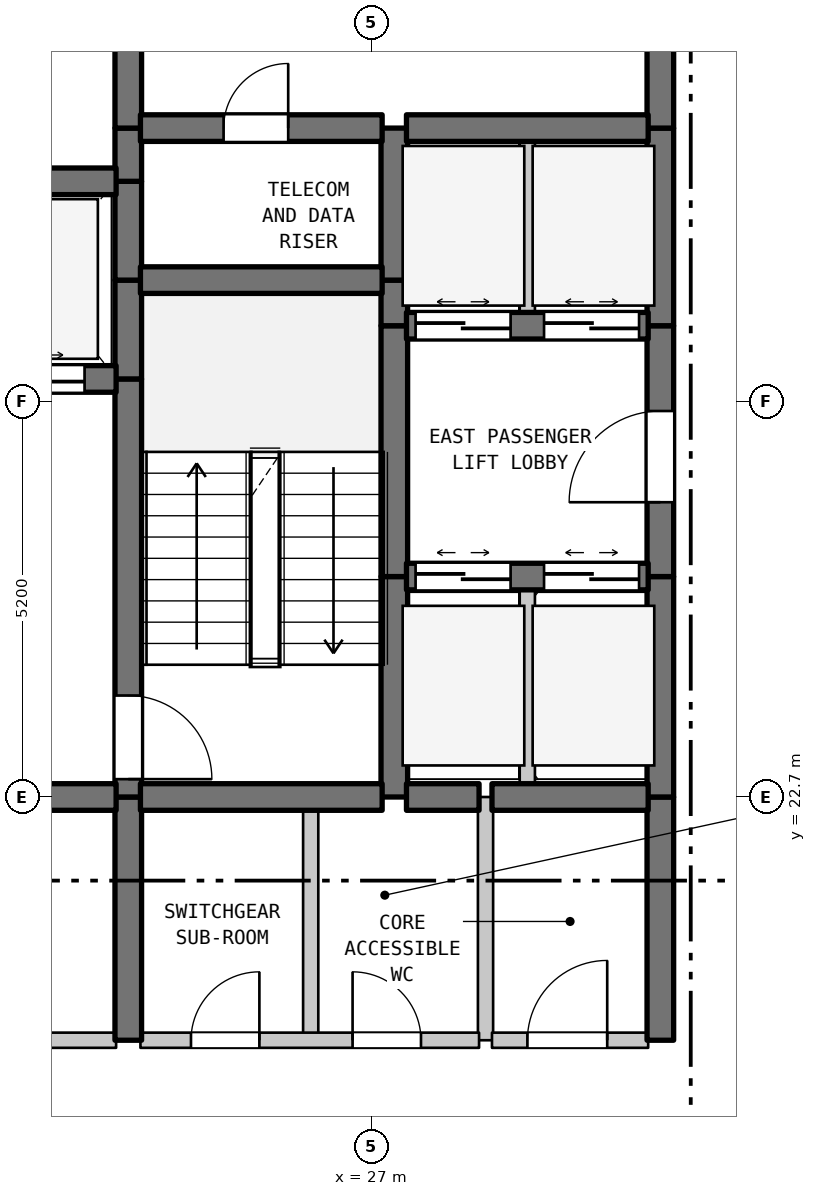
"""IFC4 building model, lengths in metres.
Left out: names, types, materials, properties, quantities, classifications, styles, units other than length and angle.
Written with IfcOpenShell. Run it as: python <this file> out.ifc"""

import sys

from ifc_helpers import new_model, si_unit, direction, frame, frame_2d, origin, place, context, subcontext, project, spatial, rectangle, extrude, element, fill, save


model = new_model("IFC4")
c1 = context("Model", 3, precision=1e-05, world=origin(), true_north=direction((0.0, 1.0)))
c2 = subcontext(c1, "Body", "Model", "MODEL_VIEW")
j1 = project(units=[si_unit("LENGTHUNIT", "METRE"), si_unit("PLANEANGLEUNIT", "RADIAN")], contexts=[c1])
p1 = place(None, origin())
s1 = spatial("IfcSite", under=j1, at=p1, CompositionType="ELEMENT")
p2 = place(p1, origin())
s2 = spatial("IfcBuilding", under=s1, at=p2, CompositionType="ELEMENT")
p3 = place(p2, frame((0.0, 0.0, 133.5)))
s3 = spatial("IfcBuildingStorey", under=s2, at=p3, CompositionType="ELEMENT", Elevation=133.5)
p4 = place(p3, frame((23.8, 19.5, 0.0), z_axis=(0.0, 0.0, 1.0), x_axis=(0.0, 1.0, 0.0)))
e1 = element("IfcWall", 1, at=p4, inside=s3, PredefinedType="SHEAR", context=c2, shape_type="SweptSolid", body=[
    extrude(rectangle(XDim=3.2, YDim=0.35, at=frame_2d((1.6, 0.0))), origin(), (0.0, 0.0, 1.0), 3.385),
])
p5 = place(p3, frame((23.8, 22.7, 0.0), z_axis=(0.0, 0.0, 1.0), x_axis=(0.0, 1.0, 0.0)))
e2 = element("IfcWall", 2, at=p5, inside=s3, PredefinedType="SHEAR", context=c2, shape_type="SweptSolid", body=[
    extrude(rectangle(XDim=5.5, YDim=0.35, at=frame_2d((2.75, 0.0))), origin(), (0.0, 0.0, 1.0), 3.385),
])
p6 = place(p5, frame((0.235, 0.0, 0.0)))
e3 = element("IfcOpeningElement", 3, at=p6, cuts=e2, PredefinedType="OPENING", context=c2, shape_type="SweptSolid", body=[
    extrude(rectangle(XDim=1.1, YDim=2.15, at=frame_2d((0.55, 1.075))), frame((0.0, 0.185, 0.0), z_axis=(0.0, -1.0, 0.0), x_axis=(1.0, 0.0, 0.0)), (0.0, 0.0, 1.0), 0.37),
])
for number, where, z_axis, x_axis in (
    (4, (23.8, 28.2, 0.0), (0.0, 0.0, 1.0), (0.0, 1.0, 0.0)),
    (5, (23.8, 29.5, 0.0), (0.0, 0.0, 1.0), (0.0, 1.0, 0.0)),
):
    element("IfcWall", number, at=place(p3, frame(where, z_axis=z_axis, x_axis=x_axis)), inside=s3, PredefinedType="SHEAR", context=c2, shape_type="SweptSolid", body=[
        extrude(rectangle(XDim=1.3, YDim=0.35, at=frame_2d((0.65, 0.0))), origin(), (0.0, 0.0, 1.0), 3.385),
    ])
p7 = place(p3, frame((23.8, 30.8, 0.0), z_axis=(0.0, 0.0, 1.0), x_axis=(0.0, 1.0, 0.0)))
e6 = element("IfcWall", 6, at=p7, inside=s3, PredefinedType="SHEAR", context=c2, shape_type="SweptSolid", body=[
    extrude(rectangle(XDim=0.7, YDim=0.35, at=frame_2d((0.35, 0.0))), origin(), (0.0, 0.0, 1.0), 3.385),
])
p8 = place(p3, frame((23.8, 31.5, 0.0), z_axis=(0.0, 0.0, 1.0), x_axis=(0.0, 1.0, 0.0)))
e7 = element("IfcWall", 7, at=p8, inside=s3, PredefinedType="SHEAR", context=c2, shape_type="SweptSolid", body=[
    extrude(rectangle(XDim=3.5, YDim=0.35, at=frame_2d((1.75, 0.0))), origin(), (0.0, 0.0, 1.0), 3.385),
])
p9 = place(p8, frame((1.127, 0.0, 0.0)))
e8 = element("IfcOpeningElement", 8, at=p9, cuts=e7, PredefinedType="OPENING", context=c2, shape_type="SweptSolid", body=[
    extrude(rectangle(XDim=1.1, YDim=2.15, at=frame_2d((0.55, 1.075))), frame((0.0, 0.185, 0.0), z_axis=(0.0, -1.0, 0.0), x_axis=(1.0, 0.0, 0.0)), (0.0, 0.0, 1.0), 0.37),
])
p10 = place(p3, frame((26.2, 19.5, 0.0), z_axis=(0.0, 0.0, 1.0), x_axis=(0.0, 1.0, 0.0)))
e9 = element("IfcWall", 9, at=p10, inside=s3, PredefinedType="STANDARD", context=c2, shape_type="SweptSolid", body=[
    extrude(rectangle(XDim=3.2, YDim=0.2, at=frame_2d((1.6, 0.0))), origin(), (0.0, 0.0, 1.0), 3.385),
])
p11 = place(p3, frame((27.3, 22.7, 0.0), z_axis=(0.0, 0.0, 1.0), x_axis=(0.0, 1.0, 0.0)))
e10 = element("IfcWall", 10, at=p11, inside=s3, PredefinedType="SHEAR", context=c2, shape_type="SweptSolid", body=[
    extrude(rectangle(XDim=2.9, YDim=0.35, at=frame_2d((1.45, 0.0))), origin(), (0.0, 0.0, 1.0), 3.385),
])
p12 = place(p3, frame((27.3, 25.6, 0.0), z_axis=(0.0, 0.0, 1.0), x_axis=(0.0, 1.0, 0.0)))
e11 = element("IfcWall", 11, at=p12, inside=s3, PredefinedType="SHEAR", context=c2, shape_type="SweptSolid", body=[
    extrude(rectangle(XDim=3.3, YDim=0.35, at=frame_2d((1.65, 0.0))), origin(), (0.0, 0.0, 1.0), 3.385),
])
p13 = place(p3, frame((27.3, 28.9, 0.0), z_axis=(0.0, 0.0, 1.0), x_axis=(0.0, 1.0, 0.0)))
e12 = element("IfcWall", 12, at=p13, inside=s3, PredefinedType="SHEAR", context=c2, shape_type="SweptSolid", body=[
    extrude(rectangle(XDim=0.6, YDim=0.35, at=frame_2d((0.3, 0.0))), origin(), (0.0, 0.0, 1.0), 3.385),
])
p14 = place(p3, frame((27.3, 29.5, 0.0), z_axis=(0.0, 0.0, 1.0), x_axis=(0.0, 1.0, 0.0)))
e13 = element("IfcWall", 13, at=p14, inside=s3, PredefinedType="SHEAR", context=c2, shape_type="SweptSolid", body=[
    extrude(rectangle(XDim=2.0, YDim=0.35, at=frame_2d((1.0, 0.0))), origin(), (0.0, 0.0, 1.0), 3.385),
])
p15 = place(p3, frame((28.5, 19.5, 0.0), z_axis=(0.0, 0.0, 1.0), x_axis=(0.0, 1.0, 0.0)))
e14 = element("IfcWall", 14, at=p15, inside=s3, PredefinedType="STANDARD", context=c2, shape_type="SweptSolid", body=[
    extrude(rectangle(XDim=3.2, YDim=0.2, at=frame_2d((1.6, 0.0))), origin(), (0.0, 0.0, 1.0), 3.385),
])
p16 = place(p3, frame((29.05, 22.7, 0.0), z_axis=(0.0, 0.0, 1.0), x_axis=(0.0, 1.0, 0.0)))
e15 = element("IfcWall", 15, at=p16, inside=s3, PredefinedType="STANDARD", context=c2, shape_type="SweptSolid", body=[
    extrude(rectangle(XDim=2.9, YDim=0.2, at=frame_2d((1.45, 0.0))), origin(), (0.0, 0.0, 1.0), 3.385),
])
p17 = place(p3, frame((29.05, 28.9, 0.0), z_axis=(0.0, 0.0, 1.0), x_axis=(0.0, 1.0, 0.0)))
e16 = element("IfcWall", 16, at=p17, inside=s3, PredefinedType="STANDARD", context=c2, shape_type="SweptSolid", body=[
    extrude(rectangle(XDim=2.6, YDim=0.2, at=frame_2d((1.3, 0.0))), origin(), (0.0, 0.0, 1.0), 3.385),
])
p18 = place(p3, frame((30.8, 19.5, 0.0), z_axis=(0.0, 0.0, 1.0), x_axis=(0.0, 1.0, 0.0)))
e17 = element("IfcWall", 17, at=p18, inside=s3, PredefinedType="SHEAR", context=c2, shape_type="SweptSolid", body=[
    extrude(rectangle(XDim=3.2, YDim=0.35, at=frame_2d((1.6, 0.0))), origin(), (0.0, 0.0, 1.0), 3.385),
])
p19 = place(p3, frame((30.8, 22.7, 0.0), z_axis=(0.0, 0.0, 1.0), x_axis=(0.0, 1.0, 0.0)))
e18 = element("IfcWall", 18, at=p19, inside=s3, PredefinedType="SHEAR", context=c2, shape_type="SweptSolid", body=[
    extrude(rectangle(XDim=2.9, YDim=0.35, at=frame_2d((1.45, 0.0))), origin(), (0.0, 0.0, 1.0), 3.385),
])
p20 = place(p3, frame((30.8, 25.6, 0.0), z_axis=(0.0, 0.0, 1.0), x_axis=(0.0, 1.0, 0.0)))
e19 = element("IfcWall", 19, at=p20, inside=s3, PredefinedType="SHEAR", context=c2, shape_type="SweptSolid", body=[
    extrude(rectangle(XDim=3.3, YDim=0.35, at=frame_2d((1.65, 0.0))), origin(), (0.0, 0.0, 1.0), 3.385),
])
p21 = place(p20, frame((0.978, 0.0, 0.0)))
e20 = element("IfcOpeningElement", 20, at=p21, cuts=e19, PredefinedType="OPENING", context=c2, shape_type="SweptSolid", body=[
    extrude(rectangle(XDim=1.2, YDim=2.2, at=frame_2d((0.6, 1.1))), frame((0.0, 0.185, 0.0), z_axis=(0.0, -1.0, 0.0), x_axis=(1.0, 0.0, 0.0)), (0.0, 0.0, 1.0), 0.37),
])
p22 = place(p3, frame((30.8, 28.9, 0.0), z_axis=(0.0, 0.0, 1.0), x_axis=(0.0, 1.0, 0.0)))
e21 = element("IfcWall", 21, at=p22, inside=s3, PredefinedType="SHEAR", context=c2, shape_type="SweptSolid", body=[
    extrude(rectangle(XDim=2.6, YDim=0.35, at=frame_2d((1.3, 0.0))), origin(), (0.0, 0.0, 1.0), 3.385),
])
p23 = place(p3, frame((30.8, 31.5, 0.0), z_axis=(0.0, 0.0, 1.0), x_axis=(0.0, 1.0, 0.0)))
e22 = element("IfcWall", 22, at=p23, inside=s3, PredefinedType="SHEAR", context=c2, shape_type="SweptSolid", body=[
    extrude(rectangle(XDim=3.5, YDim=0.35, at=frame_2d((1.75, 0.0))), origin(), (0.0, 0.0, 1.0), 3.385),
])
p24 = place(p23, frame((1.15, 0.0, 0.0)))
e23 = element("IfcOpeningElement", 23, at=p24, cuts=e22, PredefinedType="OPENING", context=c2, shape_type="SweptSolid", body=[
    extrude(rectangle(XDim=1.2, YDim=2.2, at=frame_2d((0.6, 1.1))), frame((0.0, 0.185, 0.0), z_axis=(0.0, -1.0, 0.0), x_axis=(1.0, 0.0, 0.0)), (0.0, 0.0, 1.0), 0.37),
])
p25 = place(p3, frame((19.16, 19.5, 0.0), z_axis=(0.0, 0.0, 1.0), x_axis=(1.0, 0.0, 0.0)))
e24 = element("IfcWall", 24, at=p25, inside=s3, PredefinedType="STANDARD", context=c2, shape_type="SweptSolid", body=[
    extrude(rectangle(XDim=4.48, YDim=0.2, at=frame_2d((2.24, 0.0))), origin(), (0.0, 0.0, 1.0), 3.385),
])
p26 = place(p25, frame((1.64, 0.0, 0.0)))
e25 = element("IfcOpeningElement", 25, at=p26, cuts=e24, PredefinedType="OPENING", context=c2, shape_type="SweptSolid", body=[
    extrude(rectangle(XDim=1.2, YDim=2.2, at=frame_2d((0.6, 1.1))), frame((0.0, 0.11, 0.0), z_axis=(0.0, -1.0, 0.0), x_axis=(1.0, 0.0, 0.0)), (0.0, 0.0, 1.0), 0.22),
])
p27 = place(p3, frame((23.96, 19.5, 0.0), z_axis=(0.0, 0.0, 1.0), x_axis=(1.0, 0.0, 0.0)))
e26 = element("IfcWall", 26, at=p27, inside=s3, PredefinedType="STANDARD", context=c2, shape_type="SweptSolid", body=[
    extrude(rectangle(XDim=4.455, YDim=0.2, at=frame_2d((2.228, 0.0))), origin(), (0.0, 0.0, 1.0), 3.385),
])
p28 = place(p27, frame((0.665, 0.0, 0.0)))
e27 = element("IfcOpeningElement", 27, at=p28, cuts=e26, PredefinedType="OPENING", context=c2, shape_type="SweptSolid", body=[
    extrude(rectangle(XDim=0.9, YDim=2.15, at=frame_2d((0.45, 1.075))), frame((0.0, 0.11, 0.0), z_axis=(0.0, -1.0, 0.0), x_axis=(1.0, 0.0, 0.0)), (0.0, 0.0, 1.0), 0.22),
])
p29 = place(p27, frame((2.791, 0.0, 0.0)))
e28 = element("IfcOpeningElement", 28, at=p29, cuts=e26, PredefinedType="OPENING", context=c2, shape_type="SweptSolid", body=[
    extrude(rectangle(XDim=0.9, YDim=2.15, at=frame_2d((0.45, 1.075))), frame((0.0, 0.11, 0.0), z_axis=(0.0, -1.0, 0.0), x_axis=(1.0, 0.0, 0.0)), (0.0, 0.0, 1.0), 0.22),
])
p30 = place(p3, frame((28.585, 19.5, 0.0), z_axis=(0.0, 0.0, 1.0), x_axis=(1.0, 0.0, 0.0)))
e29 = element("IfcWall", 29, at=p30, inside=s3, PredefinedType="STANDARD", context=c2, shape_type="SweptSolid", body=[
    extrude(rectangle(XDim=2.055, YDim=0.2, at=frame_2d((1.027, 0.0))), origin(), (0.0, 0.0, 1.0), 3.385),
])
p31 = place(p30, frame((0.466, 0.0, 0.0)))
e30 = element("IfcOpeningElement", 30, at=p31, cuts=e29, PredefinedType="OPENING", context=c2, shape_type="SweptSolid", body=[
    extrude(rectangle(XDim=1.05, YDim=2.15, at=frame_2d((0.525, 1.075))), frame((0.0, 0.11, 0.0), z_axis=(0.0, -1.0, 0.0), x_axis=(1.0, 0.0, 0.0)), (0.0, 0.0, 1.0), 0.22),
])
p32 = place(p3, frame((19.16, 22.7, 0.0), z_axis=(0.0, 0.0, 1.0), x_axis=(1.0, 0.0, 0.0)))
e31 = element("IfcWall", 31, at=p32, inside=s3, PredefinedType="SHEAR", context=c2, shape_type="SweptSolid", body=[
    extrude(rectangle(XDim=4.48, YDim=0.35, at=frame_2d((2.24, 0.0))), origin(), (0.0, 0.0, 1.0), 3.385),
])
p33 = place(p32, frame((1.64, 0.0, 0.0)))
e32 = element("IfcOpeningElement", 32, at=p33, cuts=e31, PredefinedType="OPENING", context=c2, shape_type="SweptSolid", body=[
    extrude(rectangle(XDim=1.2, YDim=2.2, at=frame_2d((0.6, 1.1))), frame((0.0, 0.185, 0.0), z_axis=(0.0, -1.0, 0.0), x_axis=(1.0, 0.0, 0.0)), (0.0, 0.0, 1.0), 0.37),
])
p34 = place(p3, frame((23.96, 22.7, 0.0), z_axis=(0.0, 0.0, 1.0), x_axis=(1.0, 0.0, 0.0)))
e33 = element("IfcWall", 33, at=p34, inside=s3, PredefinedType="SHEAR", context=c2, shape_type="SweptSolid", body=[
    extrude(rectangle(XDim=3.18, YDim=0.35, at=frame_2d((1.59, 0.0))), origin(), (0.0, 0.0, 1.0), 3.385),
])
p35 = place(p3, frame((27.46, 22.7, 0.0), z_axis=(0.0, 0.0, 1.0), x_axis=(1.0, 0.0, 0.0)))
e34 = element("IfcWall", 34, at=p35, inside=s3, PredefinedType="SHEAR", context=c2, shape_type="SweptSolid", body=[
    extrude(rectangle(XDim=0.955, YDim=0.35, at=frame_2d((0.478, 0.0))), origin(), (0.0, 0.0, 1.0), 3.385),
])
p36 = place(p3, frame((28.585, 22.7, 0.0), z_axis=(0.0, 0.0, 1.0), x_axis=(1.0, 0.0, 0.0)))
e35 = element("IfcWall", 35, at=p36, inside=s3, PredefinedType="SHEAR", context=c2, shape_type="SweptSolid", body=[
    extrude(rectangle(XDim=2.055, YDim=0.35, at=frame_2d((1.027, 0.0))), origin(), (0.0, 0.0, 1.0), 3.385),
])
p37 = place(p3, frame((27.46, 25.6, 0.0), z_axis=(0.0, 0.0, 1.0), x_axis=(1.0, 0.0, 0.0)))
e36 = element("IfcWall", 36, at=p37, inside=s3, PredefinedType="SHEAR", context=c2, shape_type="SweptSolid", body=[
    extrude(rectangle(XDim=3.18, YDim=0.35, at=frame_2d((1.59, 0.0))), origin(), (0.0, 0.0, 1.0), 3.385),
])
p38 = place(p37, frame((0.12, 0.0, 0.0)))
e37 = element("IfcOpeningElement", 37, at=p38, cuts=e36, PredefinedType="OPENING", context=c2, shape_type="SweptSolid", body=[
    extrude(rectangle(XDim=1.25, YDim=2.2, at=frame_2d((0.625, 1.1))), frame((0.0, 0.185, 0.0), z_axis=(0.0, -1.0, 0.0), x_axis=(1.0, 0.0, 0.0)), (0.0, 0.0, 1.0), 0.37),
])
p39 = place(p37, frame((1.81, 0.0, 0.0)))
e38 = element("IfcOpeningElement", 38, at=p39, cuts=e36, PredefinedType="OPENING", context=c2, shape_type="SweptSolid", body=[
    extrude(rectangle(XDim=1.25, YDim=2.2, at=frame_2d((0.625, 1.1))), frame((0.0, 0.185, 0.0), z_axis=(0.0, -1.0, 0.0), x_axis=(1.0, 0.0, 0.0)), (0.0, 0.0, 1.0), 0.37),
])
p40 = place(p3, frame((19.16, 28.2, 0.0), z_axis=(0.0, 0.0, 1.0), x_axis=(1.0, 0.0, 0.0)))
e39 = element("IfcWall", 39, at=p40, inside=s3, PredefinedType="SHEAR", context=c2, shape_type="SweptSolid", body=[
    extrude(rectangle(XDim=4.48, YDim=0.35, at=frame_2d((2.24, 0.0))), origin(), (0.0, 0.0, 1.0), 3.385),
])
p41 = place(p40, frame((0.415, 0.0, 0.0)))
e40 = element("IfcOpeningElement", 40, at=p41, cuts=e39, PredefinedType="OPENING", context=c2, shape_type="SweptSolid", body=[
    extrude(rectangle(XDim=1.25, YDim=2.2, at=frame_2d((0.625, 1.1))), frame((0.0, 0.185, 0.0), z_axis=(0.0, -1.0, 0.0), x_axis=(1.0, 0.0, 0.0)), (0.0, 0.0, 1.0), 0.37),
])
p42 = place(p40, frame((2.815, 0.0, 0.0)))
e41 = element("IfcOpeningElement", 41, at=p42, cuts=e39, PredefinedType="OPENING", context=c2, shape_type="SweptSolid", body=[
    extrude(rectangle(XDim=1.25, YDim=2.2, at=frame_2d((0.625, 1.1))), frame((0.0, 0.185, 0.0), z_axis=(0.0, -1.0, 0.0), x_axis=(1.0, 0.0, 0.0)), (0.0, 0.0, 1.0), 0.37),
])
p43 = place(p3, frame((27.46, 28.9, 0.0), z_axis=(0.0, 0.0, 1.0), x_axis=(1.0, 0.0, 0.0)))
e42 = element("IfcWall", 42, at=p43, inside=s3, PredefinedType="SHEAR", context=c2, shape_type="SweptSolid", body=[
    extrude(rectangle(XDim=3.18, YDim=0.35, at=frame_2d((1.59, 0.0))), origin(), (0.0, 0.0, 1.0), 3.385),
])
p44 = place(p43, frame((0.12, 0.0, 0.0)))
e43 = element("IfcOpeningElement", 43, at=p44, cuts=e42, PredefinedType="OPENING", context=c2, shape_type="SweptSolid", body=[
    extrude(rectangle(XDim=1.25, YDim=2.2, at=frame_2d((0.625, 1.1))), frame((0.0, 0.185, 0.0), z_axis=(0.0, -1.0, 0.0), x_axis=(1.0, 0.0, 0.0)), (0.0, 0.0, 1.0), 0.37),
])
p45 = place(p43, frame((1.81, 0.0, 0.0)))
e44 = element("IfcOpeningElement", 44, at=p45, cuts=e42, PredefinedType="OPENING", context=c2, shape_type="SweptSolid", body=[
    extrude(rectangle(XDim=1.25, YDim=2.2, at=frame_2d((0.625, 1.1))), frame((0.0, 0.185, 0.0), z_axis=(0.0, -1.0, 0.0), x_axis=(1.0, 0.0, 0.0)), (0.0, 0.0, 1.0), 0.37),
])
p46 = place(p3, frame((23.96, 29.5, 0.0), z_axis=(0.0, 0.0, 1.0), x_axis=(1.0, 0.0, 0.0)))
e45 = element("IfcWall", 45, at=p46, inside=s3, PredefinedType="SHEAR", context=c2, shape_type="SweptSolid", body=[
    extrude(rectangle(XDim=3.18, YDim=0.35, at=frame_2d((1.59, 0.0))), origin(), (0.0, 0.0, 1.0), 3.385),
])
p47 = place(p3, frame((19.16, 30.8, 0.0), z_axis=(0.0, 0.0, 1.0), x_axis=(1.0, 0.0, 0.0)))
e46 = element("IfcWall", 46, at=p47, inside=s3, PredefinedType="SHEAR", context=c2, shape_type="SweptSolid", body=[
    extrude(rectangle(XDim=4.48, YDim=0.35, at=frame_2d((2.24, 0.0))), origin(), (0.0, 0.0, 1.0), 3.385),
])
p48 = place(p3, frame((23.96, 31.5, 0.0), z_axis=(0.0, 0.0, 1.0), x_axis=(1.0, 0.0, 0.0)))
e47 = element("IfcWall", 47, at=p48, inside=s3, PredefinedType="SHEAR", context=c2, shape_type="SweptSolid", body=[
    extrude(rectangle(XDim=3.18, YDim=0.35, at=frame_2d((1.59, 0.0))), origin(), (0.0, 0.0, 1.0), 3.385),
])
p49 = place(p48, frame((1.094, 0.0, 0.0)))
e48 = element("IfcOpeningElement", 48, at=p49, cuts=e47, PredefinedType="OPENING", context=c2, shape_type="SweptSolid", body=[
    extrude(rectangle(XDim=0.85, YDim=2.1, at=frame_2d((0.425, 1.05))), frame((0.0, 0.185, 0.0), z_axis=(0.0, -1.0, 0.0), x_axis=(1.0, 0.0, 0.0)), (0.0, 0.0, 1.0), 0.37),
])
p50 = place(p3, frame((27.46, 31.5, 0.0), z_axis=(0.0, 0.0, 1.0), x_axis=(1.0, 0.0, 0.0)))
e49 = element("IfcWall", 49, at=p50, inside=s3, PredefinedType="SHEAR", context=c2, shape_type="SweptSolid", body=[
    extrude(rectangle(XDim=3.18, YDim=0.35, at=frame_2d((1.59, 0.0))), origin(), (0.0, 0.0, 1.0), 3.385),
])
p51 = place(p6, frame((1.1, 0.0, 0.0), z_axis=(0.0, 0.0, 1.0), x_axis=(-1.0, 0.0, 0.0)))
e50 = element("IfcDoor", 50, at=p51, inside=s3, OperationType="SINGLE_SWING_LEFT", PredefinedType="DOOR", context=c2, shape_type="SweptSolid", body=[
    extrude(rectangle(XDim=1.1, YDim=2.15, at=frame_2d((0.55, 1.075))), frame((0.0, 0.025, 0.0), z_axis=(0.0, -1.0, 0.0), x_axis=(1.0, 0.0, 0.0)), (0.0, 0.0, 1.0), 0.05),
])
fill(e3, e50)
p52 = place(p21, origin())
e51 = element("IfcDoor", 51, at=p52, inside=s3, OperationType="SINGLE_SWING_LEFT", PredefinedType="DOOR", context=c2, shape_type="SweptSolid", body=[
    extrude(rectangle(XDim=1.2, YDim=2.2, at=frame_2d((0.6, 1.1))), frame((0.0, 0.025, 0.0), z_axis=(0.0, -1.0, 0.0), x_axis=(1.0, 0.0, 0.0)), (0.0, 0.0, 1.0), 0.05),
])
fill(e20, e51)
p53 = place(p28, origin())
e52 = element("IfcDoor", 52, at=p53, inside=s3, OperationType="SINGLE_SWING_RIGHT", PredefinedType="DOOR", context=c2, shape_type="SweptSolid", body=[
    extrude(rectangle(XDim=0.9, YDim=2.15, at=frame_2d((0.45, 1.075))), frame((0.0, 0.025, 0.0), z_axis=(0.0, -1.0, 0.0), x_axis=(1.0, 0.0, 0.0)), (0.0, 0.0, 1.0), 0.05),
])
fill(e27, e52)
p54 = place(p29, origin())
e53 = element("IfcDoor", 53, at=p54, inside=s3, OperationType="SINGLE_SWING_LEFT", PredefinedType="DOOR", context=c2, shape_type="SweptSolid", body=[
    extrude(rectangle(XDim=0.9, YDim=2.15, at=frame_2d((0.45, 1.075))), frame((0.0, 0.025, 0.0), z_axis=(0.0, -1.0, 0.0), x_axis=(1.0, 0.0, 0.0)), (0.0, 0.0, 1.0), 0.05),
])
fill(e28, e53)
p55 = place(p31, origin())
e54 = element("IfcDoor", 54, at=p55, inside=s3, OperationType="SINGLE_SWING_RIGHT", PredefinedType="DOOR", context=c2, shape_type="SweptSolid", body=[
    extrude(rectangle(XDim=1.05, YDim=2.15, at=frame_2d((0.525, 1.075))), frame((0.0, 0.025, 0.0), z_axis=(0.0, -1.0, 0.0), x_axis=(1.0, 0.0, 0.0)), (0.0, 0.0, 1.0), 0.05),
])
fill(e30, e54)
p56 = place(p38, origin())
e55 = element("IfcDoor", 55, at=p56, inside=s3, OperationType="DOUBLE_DOOR_SLIDING", PredefinedType="DOOR", context=c2, shape_type="SweptSolid", body=[
    extrude(rectangle(XDim=1.25, YDim=2.2, at=frame_2d((0.625, 1.1))), frame((0.0, 0.025, 0.0), z_axis=(0.0, -1.0, 0.0), x_axis=(1.0, 0.0, 0.0)), (0.0, 0.0, 1.0), 0.05),
])
fill(e37, e55)
p57 = place(p39, origin())
e56 = element("IfcDoor", 56, at=p57, inside=s3, OperationType="DOUBLE_DOOR_SLIDING", PredefinedType="DOOR", context=c2, shape_type="SweptSolid", body=[
    extrude(rectangle(XDim=1.25, YDim=2.2, at=frame_2d((0.625, 1.1))), frame((0.0, 0.025, 0.0), z_axis=(0.0, -1.0, 0.0), x_axis=(1.0, 0.0, 0.0)), (0.0, 0.0, 1.0), 0.05),
])
fill(e38, e56)
p58 = place(p42, origin())
e57 = element("IfcDoor", 57, at=p58, inside=s3, OperationType="DOUBLE_DOOR_SLIDING", PredefinedType="DOOR", context=c2, shape_type="SweptSolid", body=[
    extrude(rectangle(XDim=1.25, YDim=2.2, at=frame_2d((0.625, 1.1))), frame((0.0, 0.025, 0.0), z_axis=(0.0, -1.0, 0.0), x_axis=(1.0, 0.0, 0.0)), (0.0, 0.0, 1.0), 0.05),
])
fill(e41, e57)
p59 = place(p44, origin())
e58 = element("IfcDoor", 58, at=p59, inside=s3, OperationType="DOUBLE_DOOR_SLIDING", PredefinedType="DOOR", context=c2, shape_type="SweptSolid", body=[
    extrude(rectangle(XDim=1.25, YDim=2.2, at=frame_2d((0.625, 1.1))), frame((0.0, 0.025, 0.0), z_axis=(0.0, -1.0, 0.0), x_axis=(1.0, 0.0, 0.0)), (0.0, 0.0, 1.0), 0.05),
])
fill(e43, e58)
p60 = place(p45, origin())
e59 = element("IfcDoor", 59, at=p60, inside=s3, OperationType="DOUBLE_DOOR_SLIDING", PredefinedType="DOOR", context=c2, shape_type="SweptSolid", body=[
    extrude(rectangle(XDim=1.25, YDim=2.2, at=frame_2d((0.625, 1.1))), frame((0.0, 0.025, 0.0), z_axis=(0.0, -1.0, 0.0), x_axis=(1.0, 0.0, 0.0)), (0.0, 0.0, 1.0), 0.05),
])
fill(e44, e59)
p61 = place(p49, origin())
e60 = element("IfcDoor", 60, at=p61, inside=s3, OperationType="SINGLE_SWING_RIGHT", PredefinedType="DOOR", context=c2, shape_type="SweptSolid", body=[
    extrude(rectangle(XDim=0.85, YDim=2.1, at=frame_2d((0.425, 1.05))), frame((0.0, 0.025, 0.0), z_axis=(0.0, -1.0, 0.0), x_axis=(1.0, 0.0, 0.0)), (0.0, 0.0, 1.0), 0.05),
])
fill(e48, e60)
save(model, sys.argv[1])
